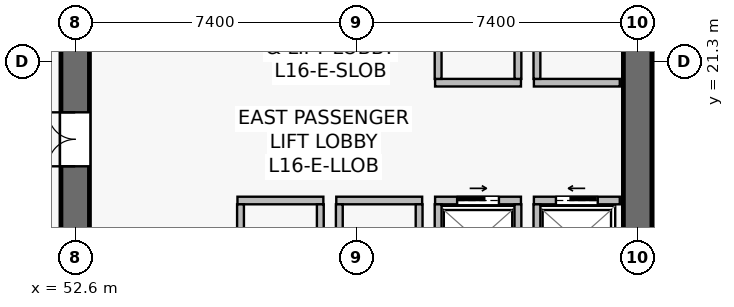
"""IFC4 building model, lengths in metres.
Left out: names, types, materials, properties, quantities, classifications, styles, units other than length and angle.
Written with IfcOpenShell. Run it as: python <this file> out.ifc"""

import sys

from ifc_helpers import new_model, si_unit, direction, frame, frame_2d, origin, place, context, subcontext, project, spatial, rectangle, extrude, source, transform, mapped, element, fill, save


model = new_model("IFC4")
c1 = context("Model", 3, precision=1e-05, world=origin(), true_north=direction((0.0, 1.0)))
c2 = subcontext(c1, "Body", "Model", "MODEL_VIEW")
j1 = project(units=[si_unit("LENGTHUNIT", "METRE"), si_unit("PLANEANGLEUNIT", "RADIAN")], contexts=[c1])
p1 = place(None, origin())
s1 = spatial("IfcSite", under=j1, at=p1, CompositionType="ELEMENT")
p2 = place(p1, origin())
s2 = spatial("IfcBuilding", under=s1, at=p2, CompositionType="ELEMENT")
p3 = place(p2, frame((0.0, 0.0, 66.2)))
s3 = spatial("IfcBuildingStorey", under=s2, at=p3, CompositionType="ELEMENT", Elevation=66.2)
p4 = place(p3, frame((52.6, 15.175, 0.0), z_axis=(0.0, 0.0, 1.0), x_axis=(0.0, 1.0, 0.0)))
e1 = element("IfcWall", 1, at=p4, inside=s3, PredefinedType="SHEAR", context=c2, shape_type="SweptSolid", body=[
    extrude(rectangle(XDim=18.25, YDim=0.75, at=frame_2d((9.125, 0.0))), origin(), (0.0, 0.0, 1.0), 3.78),
])
p5 = place(p4, frame((3.375, 0.0, 0.0)))
e2 = element("IfcOpeningElement", 2, at=p5, cuts=e1, PredefinedType="OPENING", context=c2, shape_type="SweptSolid", body=[
    extrude(rectangle(XDim=1.42, YDim=2.2, at=frame_2d((0.71, 1.1))), frame((0.0, 0.385, 0.0), z_axis=(0.0, -1.0, 0.0), x_axis=(1.0, 0.0, 0.0)), (0.0, 0.0, 1.0), 0.77),
])
p6 = place(p3, frame((67.4, 15.175, 0.0), z_axis=(0.0, 0.0, 1.0), x_axis=(0.0, 1.0, 0.0)))
e3 = element("IfcWall", 3, at=p6, inside=s3, PredefinedType="SHEAR", context=c2, shape_type="SweptSolid", body=[
    extrude(rectangle(XDim=18.25, YDim=0.75, at=frame_2d((9.125, 0.0))), origin(), (0.0, 0.0, 1.0), 3.78),
])
p7 = place(p3, frame((64.67, 17.65, 0.0), z_axis=(0.0, 0.0, 1.0), x_axis=(1.0, 0.0, 0.0)))
e4 = element("IfcWall", 4, at=p7, inside=s3, PredefinedType="SOLIDWALL", context=c2, shape_type="SweptSolid", body=[
    extrude(rectangle(XDim=2.26, YDim=0.2, at=frame_2d((1.13, 0.0))), origin(), (0.0, 0.0, 1.0), 3.78),
])
p8 = place(p7, frame((0.58, 0.0, 0.0)))
e5 = element("IfcOpeningElement", 5, at=p8, cuts=e4, PredefinedType="OPENING", context=c2, shape_type="SweptSolid", body=[
    extrude(rectangle(XDim=1.1, YDim=2.22, at=frame_2d((0.55, 1.11))), frame((0.0, 0.11, 0.0), z_axis=(0.0, -1.0, 0.0), x_axis=(1.0, 0.0, 0.0)), (0.0, 0.0, 1.0), 0.22),
])
p9 = place(p3, frame((64.75, 15.65, 0.0), z_axis=(0.0, 0.0, 1.0), x_axis=(0.0, 1.0, 0.0)))
e6 = element("IfcWall", 6, at=p9, inside=s3, PredefinedType="SOLIDWALL", context=c2, shape_type="SweptSolid", body=[
    extrude(rectangle(XDim=1.9, YDim=0.18, at=frame_2d((0.95, 0.0))), origin(), (0.0, 0.0, 1.0), 3.78),
])
p10 = place(p3, frame((62.07, 17.65, 0.0), z_axis=(0.0, 0.0, 1.0), x_axis=(1.0, 0.0, 0.0)))
e7 = element("IfcWall", 7, at=p10, inside=s3, PredefinedType="SOLIDWALL", context=c2, shape_type="SweptSolid", body=[
    extrude(rectangle(XDim=2.26, YDim=0.2, at=frame_2d((1.13, 0.0))), origin(), (0.0, 0.0, 1.0), 3.78),
])
p11 = place(p10, frame((0.58, 0.0, 0.0)))
e8 = element("IfcOpeningElement", 8, at=p11, cuts=e7, PredefinedType="OPENING", context=c2, shape_type="SweptSolid", body=[
    extrude(rectangle(XDim=1.1, YDim=2.22, at=frame_2d((0.55, 1.11))), frame((0.0, 0.11, 0.0), z_axis=(0.0, -1.0, 0.0), x_axis=(1.0, 0.0, 0.0)), (0.0, 0.0, 1.0), 0.22),
])
for number, where, z_axis, x_axis in (
    (9, (62.15, 15.65, 0.0), (0.0, 0.0, 1.0), (0.0, 1.0, 0.0)),
    (10, (64.25, 15.65, 0.0), (0.0, 0.0, 1.0), (0.0, 1.0, 0.0)),
):
    element("IfcWall", number, at=place(p3, frame(where, z_axis=z_axis, x_axis=x_axis)), inside=s3, PredefinedType="SOLIDWALL", context=c2, shape_type="SweptSolid", body=[
        extrude(rectangle(XDim=1.9, YDim=0.18, at=frame_2d((0.95, 0.0))), origin(), (0.0, 0.0, 1.0), 3.78),
    ])
p12 = place(p3, frame((59.47, 17.65, 0.0), z_axis=(0.0, 0.0, 1.0), x_axis=(1.0, 0.0, 0.0)))
e11 = element("IfcWall", 11, at=p12, inside=s3, PredefinedType="SOLIDWALL", context=c2, shape_type="SweptSolid", body=[
    extrude(rectangle(XDim=2.26, YDim=0.2, at=frame_2d((1.13, 0.0))), origin(), (0.0, 0.0, 1.0), 3.115),
])
for number, where, z_axis, x_axis in (
    (12, (59.55, 15.65, 0.0), (0.0, 0.0, 1.0), (0.0, 1.0, 0.0)),
    (13, (61.65, 15.65, 0.0), (0.0, 0.0, 1.0), (0.0, 1.0, 0.0)),
):
    element("IfcWall", number, at=place(p3, frame(where, z_axis=z_axis, x_axis=x_axis)), inside=s3, PredefinedType="SOLIDWALL", context=c2, shape_type="SweptSolid", body=[
        extrude(rectangle(XDim=1.9, YDim=0.18, at=frame_2d((0.95, 0.0))), origin(), (0.0, 0.0, 1.0), 3.78),
    ])
p13 = place(p3, frame((56.87, 17.65, 0.0), z_axis=(0.0, 0.0, 1.0), x_axis=(1.0, 0.0, 0.0)))
e14 = element("IfcWall", 14, at=p13, inside=s3, PredefinedType="SOLIDWALL", context=c2, shape_type="SweptSolid", body=[
    extrude(rectangle(XDim=2.26, YDim=0.2, at=frame_2d((1.13, 0.0))), origin(), (0.0, 0.0, 1.0), 3.78),
])
for number, where, z_axis, x_axis in (
    (15, (56.95, 15.65, 0.0), (0.0, 0.0, 1.0), (0.0, 1.0, 0.0)),
    (16, (59.05, 15.65, 0.0), (0.0, 0.0, 1.0), (0.0, 1.0, 0.0)),
):
    element("IfcWall", number, at=place(p3, frame(where, z_axis=z_axis, x_axis=x_axis)), inside=s3, PredefinedType="SOLIDWALL", context=c2, shape_type="SweptSolid", body=[
        extrude(rectangle(XDim=1.9, YDim=0.18, at=frame_2d((0.95, 0.0))), origin(), (0.0, 0.0, 1.0), 3.78),
    ])
p14 = place(p3, frame((64.67, 20.75, 0.0), z_axis=(0.0, 0.0, 1.0), x_axis=(1.0, 0.0, 0.0)))
e17 = element("IfcWall", 17, at=p14, inside=s3, PredefinedType="SOLIDWALL", context=c2, shape_type="SweptSolid", body=[
    extrude(rectangle(XDim=2.26, YDim=0.2, at=frame_2d((1.13, 0.0))), origin(), (0.0, 0.0, 1.0), 3.78),
])
p15 = place(p3, frame((64.75, 20.85, 0.0), z_axis=(0.0, 0.0, 1.0), x_axis=(0.0, 1.0, 0.0)))
e18 = element("IfcWall", 18, at=p15, inside=s3, PredefinedType="SOLIDWALL", context=c2, shape_type="SweptSolid", body=[
    extrude(rectangle(XDim=1.9, YDim=0.18, at=frame_2d((0.95, 0.0))), origin(), (0.0, 0.0, 1.0), 3.78),
])
p16 = place(p3, frame((62.07, 20.75, 0.0), z_axis=(0.0, 0.0, 1.0), x_axis=(1.0, 0.0, 0.0)))
e19 = element("IfcWall", 19, at=p16, inside=s3, PredefinedType="SOLIDWALL", context=c2, shape_type="SweptSolid", body=[
    extrude(rectangle(XDim=2.26, YDim=0.2, at=frame_2d((1.13, 0.0))), origin(), (0.0, 0.0, 1.0), 3.78),
])
for number, where, z_axis, x_axis in (
    (20, (62.15, 20.85, 0.0), (0.0, 0.0, 1.0), (0.0, 1.0, 0.0)),
    (21, (64.25, 20.85, 0.0), (0.0, 0.0, 1.0), (0.0, 1.0, 0.0)),
):
    element("IfcWall", number, at=place(p3, frame(where, z_axis=z_axis, x_axis=x_axis)), inside=s3, PredefinedType="SOLIDWALL", context=c2, shape_type="SweptSolid", body=[
        extrude(rectangle(XDim=1.9, YDim=0.18, at=frame_2d((0.95, 0.0))), origin(), (0.0, 0.0, 1.0), 3.78),
    ])
m1 = source(origin(), c2, "Body", "SweptSolid", [
    extrude(rectangle(XDim=1.1, YDim=2.22, at=frame_2d((0.55, 1.11))), frame((0.0, 0.025, 0.0), z_axis=(0.0, -1.0, 0.0), x_axis=(1.0, 0.0, 0.0)), (0.0, 0.0, 1.0), 0.05),
])
p17 = place(p8, origin())
e22 = element("IfcDoor", 22, at=p17, inside=s3, OperationType="SLIDING_TO_LEFT", PredefinedType="USERDEFINED", context=c2, shape_type="MappedRepresentation", body=[
    mapped(m1, transform((0.0, 0.0, 0.0), scale=1.0)),
])
fill(e5, e22)
p18 = place(p11, origin())
e23 = element("IfcDoor", 23, at=p18, inside=s3, OperationType="SLIDING_TO_RIGHT", PredefinedType="USERDEFINED", context=c2, shape_type="MappedRepresentation", body=[
    mapped(m1, transform((0.0, 0.0, 0.0), scale=1.0)),
])
fill(e8, e23)
m2 = source(origin(), c2, "Body", "SweptSolid", [
    extrude(rectangle(XDim=1.42, YDim=2.2, at=frame_2d((0.71, 1.1))), frame((0.0, 0.025, 0.0), z_axis=(0.0, -1.0, 0.0), x_axis=(1.0, 0.0, 0.0)), (0.0, 0.0, 1.0), 0.05),
])
p19 = place(p5, origin())
e24 = element("IfcDoor", 24, at=p19, inside=s3, OperationType="DOUBLE_DOOR_SINGLE_SWING", PredefinedType="DOOR", context=c2, shape_type="MappedRepresentation", body=[
    mapped(m2, transform((0.0, 0.0, 0.0), scale=1.0)),
])
fill(e2, e24)
save(model, sys.argv[1])
